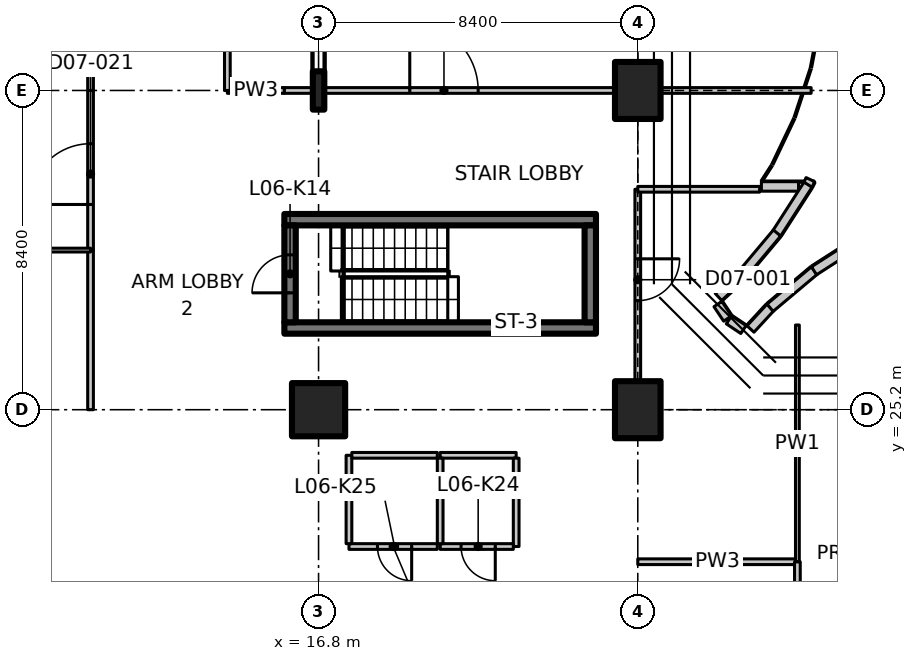
"""IFC4 building model, lengths in metres.
Left out: names, types, materials, properties, quantities, classifications, styles, units other than length and angle.
Written with IfcOpenShell. Run it as: python <this file> out.ifc"""

import sys

from ifc_helpers import new_model, si_unit, direction, frame, frame_2d, origin, origin_2d, place, context, subcontext, project, spatial, polyline, rectangle, i_section, outline, extrude, element, fill, save


model = new_model("IFC4")
c1 = context("Model", 3, precision=1e-05, world=origin(), true_north=direction((0.0, 1.0)))
c2 = subcontext(c1, "Body", "Model", "MODEL_VIEW")
j1 = project(units=[si_unit("LENGTHUNIT", "METRE"), si_unit("PLANEANGLEUNIT", "RADIAN")], contexts=[c1])
p1 = place(None, origin())
s1 = spatial("IfcSite", under=j1, at=p1, CompositionType="ELEMENT")
p2 = place(p1, origin())
s2 = spatial("IfcBuilding", under=s1, at=p2, CompositionType="ELEMENT")
p3 = place(p2, frame((0.0, 0.0, 36.5)))
s3 = spatial("IfcBuildingStorey", under=s2, at=p3, CompositionType="ELEMENT", Elevation=36.5)
p4 = place(p3, frame((16.8, 25.2, 0.0), z_axis=(0.0, 0.0, 1.0), x_axis=(1.0, 0.0, 0.0)))
e1 = element("IfcColumn", 1, at=p4, inside=s3, PredefinedType="COLUMN", context=c2, shape_type="SweptSolid", body=[
    extrude(rectangle(XDim=1.4, YDim=1.4, at=origin_2d()), origin(), (0.0, 0.0, 1.0), 3.35),
])
for number, where, z_axis, x_axis in (
    (2, (25.2, 25.2, 0.0), (0.0, 0.0, 1.0), (1.0, 0.0, 0.0)),
    (3, (25.2, 33.6, 0.0), (0.0, 0.0, 1.0), (1.0, 0.0, 0.0)),
):
    element("IfcColumn", number, at=place(p3, frame(where, z_axis=z_axis, x_axis=x_axis)), inside=s3, PredefinedType="COLUMN", context=c2, shape_type="SweptSolid", body=[
        extrude(rectangle(XDim=1.2, YDim=1.5, at=origin_2d()), origin(), (0.0, 0.0, 1.0), 3.35),
    ])
p5 = place(p3, frame((16.8, 33.6, -0.25), z_axis=(0.0, 0.0, 1.0), x_axis=(1.0, 0.0, 0.0)))
e4 = element("IfcColumn", 4, at=p5, inside=s3, PredefinedType="COLUMN", context=c2, shape_type="SweptSolid", body=[
    extrude(i_section(OverallWidth=0.302, OverallDepth=1.008, WebThickness=0.021, FlangeThickness=0.04, FilletRadius=0.03, at=origin_2d()), origin(), (0.0, 0.0, 1.0), 3.725),
])
p6 = place(p3, frame((28.453, 31.075, 0.0), z_axis=(0.0, 0.0, 1.0), x_axis=(1.0, 0.0, 0.0)))
e5 = element("IfcWall", 5, at=p6, inside=s3, PredefinedType="PARAPET", context=c2, shape_type="SweptSolid", body=[
    extrude(rectangle(XDim=0.977, YDim=0.25, at=frame_2d((0.489, 0.0))), origin(), (0.0, 0.0, 1.0), 1.1),
])
p7 = place(p3, frame((29.742, 31.254, 0.0), z_axis=(0.0, 0.0, 1.0), x_axis=(-0.430340964607, -0.902666413566, 0.0)))
e6 = element("IfcWall", 6, at=p7, inside=s3, PredefinedType="PARAPET", context=c2, shape_type="SweptSolid", body=[
    extrude(rectangle(XDim=0.163, YDim=0.25, at=frame_2d((0.082, 0.0))), origin(), (0.0, 0.0, 1.0), 1.1),
])
for number, where, z_axis, x_axis in (
    (7, (29.68, 31.121, 0.0), (0.0, 0.0, 1.0), (-0.541, -0.841, 0.0)),
    (8, (28.864, 29.85, 0.0), (0.0, 0.0, 1.0), (-0.643, -0.766, 0.0)),
):
    element("IfcWall", number, at=place(p3, frame(where, z_axis=z_axis, x_axis=x_axis)), inside=s3, PredefinedType="PARAPET", context=c2, shape_type="SweptSolid", body=[
        extrude(rectangle(XDim=1.526, YDim=0.25, at=frame_2d((0.763, 0.0))), origin(), (0.0, 0.0, 1.0), 1.1),
    ])
p8 = place(p3, frame((27.894, 28.693, 0.0), z_axis=(0.0, 0.0, 1.0), x_axis=(-0.734682907752, -0.678410661073, 0.0)))
e9 = element("IfcWall", 9, at=p8, inside=s3, PredefinedType="PARAPET", context=c2, shape_type="SweptSolid", body=[
    extrude(rectangle(XDim=0.777, YDim=0.25, at=frame_2d((0.388, 0.0))), origin(), (0.0, 0.0, 1.0), 1.1),
])
for number, where, z_axis, x_axis in (
    (10, (27.309, 27.98, 0.0), (0.0, 0.0, 1.0), (0.556, -0.831, 0.0)),
    (11, (27.599, 27.564, 0.0), (0.0, 0.0, 1.0), (0.831, -0.556, 0.0)),
):
    element("IfcWall", number, at=place(p3, frame(where, z_axis=z_axis, x_axis=x_axis)), inside=s3, PredefinedType="PARAPET", context=c2, shape_type="SweptSolid", body=[
        extrude(rectangle(XDim=0.459, YDim=0.25, at=frame_2d((0.229, 0.0))), origin(), (0.0, 0.0, 1.0), 1.1),
    ])
p9 = place(p3, frame((28.166, 27.323, 0.0), z_axis=(0.0, 0.0, 1.0), x_axis=(0.678410661073, 0.734682907752, 0.0)))
e12 = element("IfcWall", 12, at=p9, inside=s3, PredefinedType="PARAPET", context=c2, shape_type="SweptSolid", body=[
    extrude(rectangle(XDim=0.777, YDim=0.25, at=frame_2d((0.388, 0.0))), origin(), (0.0, 0.0, 1.0), 1.1),
])
for number, where, z_axis, x_axis in (
    (13, (28.682, 27.883, 0.0), (0.0, 0.0, 1.0), (0.766, 0.643, 0.0)),
    (14, (29.837, 28.854, 0.0), (0.0, 0.0, 1.0), (0.841, 0.541, 0.0)),
):
    element("IfcWall", number, at=place(p3, frame(where, z_axis=z_axis, x_axis=x_axis)), inside=s3, PredefinedType="PARAPET", context=c2, shape_type="SweptSolid", body=[
        extrude(rectangle(XDim=1.526, YDim=0.25, at=frame_2d((0.763, 0.0))), origin(), (0.0, 0.0, 1.0), 1.1),
    ])
for number, where, z_axis, x_axis in (
    (15, (15.9, 27.35, 0.0), (0.0, 0.0, 1.0), (1.0, 0.0, 0.0)),
    (16, (15.9, 30.2, 0.0), (0.0, 0.0, 1.0), (1.0, 0.0, 0.0)),
):
    element("IfcWall", number, at=place(p3, frame(where, z_axis=z_axis, x_axis=x_axis)), inside=s3, PredefinedType="SHEAR", context=c2, shape_type="SweptSolid", body=[
        extrude(rectangle(XDim=8.2, YDim=0.3, at=frame_2d((4.1, 0.0))), origin(), (0.0, 0.0, 1.0), 3.35),
    ])
p10 = place(p3, frame((16.05, 27.5, 0.0), z_axis=(0.0, 0.0, 1.0), x_axis=(0.0, 1.0, 0.0)))
e17 = element("IfcWall", 17, at=p10, inside=s3, PredefinedType="SHEAR", context=c2, shape_type="SweptSolid", body=[
    extrude(rectangle(XDim=2.55, YDim=0.3, at=frame_2d((1.275, 0.0))), origin(), (0.0, 0.0, 1.0), 3.35),
])
p11 = place(p10, frame((0.775, 0.0, 0.0)))
e18 = element("IfcOpeningElement", 18, at=p11, cuts=e17, PredefinedType="OPENING", context=c2, shape_type="SweptSolid", body=[
    extrude(rectangle(XDim=1.0, YDim=2.1, at=frame_2d((0.5, 1.05))), frame((0.0, 0.16, 0.0), z_axis=(0.0, -1.0, 0.0), x_axis=(1.0, 0.0, 0.0)), (0.0, 0.0, 1.0), 0.32),
])
p12 = place(p3, frame((23.95, 27.5, 0.0), z_axis=(0.0, 0.0, 1.0), x_axis=(0.0, 1.0, 0.0)))
e19 = element("IfcWall", 19, at=p12, inside=s3, PredefinedType="SHEAR", context=c2, shape_type="SweptSolid", body=[
    extrude(rectangle(XDim=2.55, YDim=0.3, at=frame_2d((1.275, 0.0))), origin(), (0.0, 0.0, 1.0), 3.35),
])
p13 = place(p3, frame((20.0, 24.0, 0.0), z_axis=(0.0, 0.0, 1.0), x_axis=(1.0, 0.0, 0.0)))
e20 = element("IfcWall", 20, at=p13, inside=s3, PredefinedType="PARTITIONING", context=c2, shape_type="SweptSolid", body=[
    extrude(rectangle(XDim=2.0, YDim=0.15, at=frame_2d((1.0, 0.0))), origin(), (0.0, 0.0, 1.0), 3.35),
])
p14 = place(p3, frame((22.0, 23.925, 0.0), z_axis=(0.0, 0.0, 1.0), x_axis=(0.0, -1.0, 0.0)))
e21 = element("IfcWall", 21, at=p14, inside=s3, PredefinedType="PARTITIONING", context=c2, shape_type="SweptSolid", body=[
    extrude(rectangle(XDim=2.325, YDim=0.15, at=frame_2d((1.163, 0.0))), origin(), (0.0, 0.0, 1.0), 3.35),
])
p15 = place(p3, frame((21.925, 21.6, 0.0), z_axis=(0.0, 0.0, 1.0), x_axis=(-1.0, 0.0, 0.0)))
e22 = element("IfcWall", 22, at=p15, inside=s3, PredefinedType="PARTITIONING", context=c2, shape_type="SweptSolid", body=[
    extrude(rectangle(XDim=1.925, YDim=0.15, at=frame_2d((0.962, 0.0))), origin(), (0.0, 0.0, 1.0), 3.35),
])
p16 = place(p15, frame((0.475, 0.0, 0.0)))
e23 = element("IfcOpeningElement", 23, at=p16, cuts=e22, PredefinedType="OPENING", context=c2, shape_type="SweptSolid", body=[
    extrude(rectangle(XDim=0.9, YDim=2.1, at=frame_2d((0.45, 1.05))), frame((0.0, 0.085, 0.0), z_axis=(0.0, -1.0, 0.0), x_axis=(1.0, 0.0, 0.0)), (0.0, 0.0, 1.0), 0.17),
])
p17 = place(p3, frame((20.0, 21.675, 0.0), z_axis=(0.0, 0.0, 1.0), x_axis=(0.0, 1.0, 0.0)))
e24 = element("IfcWall", 24, at=p17, inside=s3, PredefinedType="PARTITIONING", context=c2, shape_type="SweptSolid", body=[
    extrude(rectangle(XDim=2.25, YDim=0.15, at=frame_2d((1.125, 0.0))), origin(), (0.0, 0.0, 1.0), 3.35),
])
p18 = place(p3, frame((19.925, 21.6, 0.0), z_axis=(0.0, 0.0, 1.0), x_axis=(-1.0, 0.0, 0.0)))
e25 = element("IfcWall", 25, at=p18, inside=s3, PredefinedType="PARTITIONING", context=c2, shape_type="SweptSolid", body=[
    extrude(rectangle(XDim=2.325, YDim=0.15, at=frame_2d((1.163, 0.0))), origin(), (0.0, 0.0, 1.0), 3.35),
])
p19 = place(p18, frame((0.675, 0.0, 0.0)))
e26 = element("IfcOpeningElement", 26, at=p19, cuts=e25, PredefinedType="OPENING", context=c2, shape_type="SweptSolid", body=[
    extrude(rectangle(XDim=0.9, YDim=2.1, at=frame_2d((0.45, 1.05))), frame((0.0, 0.085, 0.0), z_axis=(0.0, -1.0, 0.0), x_axis=(1.0, 0.0, 0.0)), (0.0, 0.0, 1.0), 0.17),
])
p20 = place(p3, frame((17.6, 21.675, 0.0), z_axis=(0.0, 0.0, 1.0), x_axis=(0.0, 1.0, 0.0)))
e27 = element("IfcWall", 27, at=p20, inside=s3, PredefinedType="PARTITIONING", context=c2, shape_type="SweptSolid", body=[
    extrude(rectangle(XDim=2.325, YDim=0.15, at=frame_2d((1.163, 0.0))), origin(), (0.0, 0.0, 1.0), 3.35),
])
p21 = place(p3, frame((17.675, 24.0, 0.0), z_axis=(0.0, 0.0, 1.0), x_axis=(1.0, 0.0, 0.0)))
e28 = element("IfcWall", 28, at=p21, inside=s3, PredefinedType="PARTITIONING", context=c2, shape_type="SweptSolid", body=[
    extrude(rectangle(XDim=2.25, YDim=0.15, at=frame_2d((1.125, 0.0))), origin(), (0.0, 0.0, 1.0), 3.35),
])
p22 = place(p3, frame((25.2, 21.2, 0.0), z_axis=(0.0, 0.0, 1.0), x_axis=(1.0, 0.0, 0.0)))
e29 = element("IfcWall", 29, at=p22, inside=s3, PredefinedType="PARTITIONING", context=c2, shape_type="SweptSolid", body=[
    extrude(rectangle(XDim=4.2, YDim=0.15, at=frame_2d((2.1, 0.0))), origin(), (0.0, 0.0, 1.0), 3.33),
])
p23 = place(p3, frame((29.4, 21.2, 0.0), z_axis=(0.0, 0.0, 1.0), x_axis=(0.0, -1.0, 0.0)))
e30 = element("IfcWall", 30, at=p23, inside=s3, PredefinedType="PARTITIONING", context=c2, shape_type="SweptSolid", body=[
    extrude(rectangle(XDim=8.2, YDim=0.15, at=frame_2d((4.1, 0.0))), origin(), (0.0, 0.0, 1.0), 3.33),
])
p24 = place(p23, frame((3.3, 0.0, 0.0)))
e31 = element("IfcOpeningElement", 31, at=p24, cuts=e30, PredefinedType="OPENING", context=c2, shape_type="SweptSolid", body=[
    extrude(rectangle(XDim=1.6, YDim=2.1, at=frame_2d((0.8, 1.05))), frame((0.0, 0.085, 0.0), z_axis=(0.0, -1.0, 0.0), x_axis=(1.0, 0.0, 0.0)), (0.0, 0.0, 1.0), 0.17),
])
p25 = place(p3, frame((29.4, 27.429, 0.0), z_axis=(0.0, 0.0, 1.0), x_axis=(0.0, -1.0, 0.0)))
e32 = element("IfcWall", 32, at=p25, inside=s3, PredefinedType="PARTITIONING", context=c2, shape_type="SweptSolid", body=[
    extrude(outline(polyline([(0.0, 0.0), (6.229, 0.0), (6.229, 3.33), (2.679, 3.33), (2.677, 2.98), (1.781, 2.98), (1.779, 3.33), (0.154, 3.33), (0.0, 3.33), (0.0, 0.0)])), frame((0.0, 0.05, 0.0), z_axis=(0.0, -1.0, 0.0), x_axis=(1.0, 0.0, 0.0)), (0.0, 0.0, 1.0), 0.1),
])
p26 = place(p3, frame((25.2, 31.0, 0.0), z_axis=(0.0, 0.0, 1.0), x_axis=(0.0, -1.0, 0.0)))
e33 = element("IfcWall", 33, at=p26, inside=s3, PredefinedType="PARTITIONING", context=c2, shape_type="SweptSolid", body=[
    extrude(outline(polyline([(0.0, 0.0), (5.03, 0.0), (5.03, 2.98), (0.0, 2.98), (0.0, 0.0)])), frame((0.0, 0.075, 0.0), z_axis=(0.0, -1.0, 0.0), x_axis=(1.0, 0.0, 0.0)), (0.0, 0.0, 1.0), 0.15),
])
p27 = place(p26, frame((1.83, 0.0, 0.0)))
e34 = element("IfcOpeningElement", 34, at=p27, cuts=e33, PredefinedType="OPENING", context=c2, shape_type="SweptSolid", body=[
    extrude(rectangle(XDim=1.1, YDim=2.1, at=frame_2d((0.55, 1.05))), frame((0.0, 0.085, 0.0), z_axis=(0.0, -1.0, 0.0), x_axis=(1.0, 0.0, 0.0)), (0.0, 0.0, 1.0), 0.17),
])
p28 = place(p3, frame((25.2, 31.0, 0.0), z_axis=(0.0, 0.0, 1.0), x_axis=(1.0, 0.0, 0.0)))
e35 = element("IfcWall", 35, at=p28, inside=s3, PredefinedType="PARTITIONING", context=c2, shape_type="SweptSolid", body=[
    extrude(rectangle(XDim=3.206, YDim=0.15, at=frame_2d((1.603, 0.0))), origin(), (0.0, 0.0, 1.0), 2.98),
])
p29 = place(p3, frame((10.8, 29.4, 0.0), z_axis=(0.0, 0.0, 1.0), x_axis=(0.0, 1.0, 0.0)))
e36 = element("IfcWall", 36, at=p29, inside=s3, PredefinedType="PARTITIONING", context=c2, shape_type="SweptSolid", body=[
    extrude(rectangle(XDim=4.2, YDim=0.15, at=frame_2d((2.1, 0.0))), origin(), (0.0, 0.0, 1.0), 3.33),
])
p30 = place(p29, frame((1.2, 0.0, 0.0)))
e37 = element("IfcOpeningElement", 37, at=p30, cuts=e36, PredefinedType="OPENING", context=c2, shape_type="SweptSolid", body=[
    extrude(rectangle(XDim=1.6, YDim=2.1, at=frame_2d((0.8, 1.05))), frame((0.0, 0.085, 0.0), z_axis=(0.0, -1.0, 0.0), x_axis=(1.0, 0.0, 0.0)), (0.0, 0.0, 1.0), 0.17),
])
p31 = place(p3, frame((10.8, 25.2, 0.0), z_axis=(0.0, 0.0, 1.0), x_axis=(0.0, 1.0, 0.0)))
e38 = element("IfcWall", 38, at=p31, inside=s3, PredefinedType="PARTITIONING", context=c2, shape_type="SweptSolid", body=[
    extrude(rectangle(XDim=4.2, YDim=0.15, at=frame_2d((2.1, 0.0))), origin(), (0.0, 0.0, 1.0), 3.33),
])
p32 = place(p3, frame((14.4, 33.6, 0.0), z_axis=(0.0, 0.0, 1.0), x_axis=(1.0, 0.0, 0.0)))
e39 = element("IfcWall", 39, at=p32, inside=s3, PredefinedType="PARTITIONING", context=c2, shape_type="SweptSolid", body=[
    extrude(rectangle(XDim=1.5, YDim=0.15, at=frame_2d((0.75, 0.0))), origin(), (0.0, 0.0, 1.0), 3.33),
])
p33 = place(p3, frame((15.9, 33.6, 0.0), z_axis=(0.0, 0.0, 1.0), x_axis=(1.0, 0.0, 0.0)))
e40 = element("IfcWall", 40, at=p33, inside=s3, PredefinedType="PARTITIONING", context=c2, shape_type="SweptSolid", body=[
    extrude(rectangle(XDim=8.68, YDim=0.15, at=frame_2d((4.34, 0.0))), origin(), (0.0, 0.0, 1.0), 3.33),
])
p34 = place(p33, frame((3.3, 0.0, 0.0)))
e41 = element("IfcOpeningElement", 41, at=p34, cuts=e40, PredefinedType="OPENING", context=c2, shape_type="SweptSolid", body=[
    extrude(rectangle(XDim=1.8, YDim=2.1, at=frame_2d((0.9, 1.05))), frame((0.0, 0.085, 0.0), z_axis=(0.0, -1.0, 0.0), x_axis=(1.0, 0.0, 0.0)), (0.0, 0.0, 1.0), 0.17),
])
p35 = place(p3, frame((25.82, 33.6, 0.0), z_axis=(0.0, 0.0, 1.0), x_axis=(1.0, 0.0, 0.0)))
e42 = element("IfcWall", 42, at=p35, inside=s3, PredefinedType="PARTITIONING", context=c2, shape_type="SweptSolid", body=[
    extrude(rectangle(XDim=3.942, YDim=0.15, at=frame_2d((1.971, 0.0))), origin(), (0.0, 0.0, 1.0), 2.98),
])
p36 = place(p3, frame((10.8, 33.6, 0.0), z_axis=(0.0, 0.0, 1.0), x_axis=(0.0, 1.0, 0.0)))
e43 = element("IfcWall", 43, at=p36, inside=s3, PredefinedType="PARTITIONING", context=c2, shape_type="SweptSolid", body=[
    extrude(rectangle(XDim=4.2, YDim=0.15, at=frame_2d((2.1, 0.0))), origin(), (0.0, 0.0, 1.0), 3.33),
])
p37 = place(p3, frame((14.4, 42.0, 0.0), z_axis=(0.0, 0.0, 1.0), x_axis=(0.0, -1.0, 0.0)))
e44 = element("IfcWall", 44, at=p37, inside=s3, PredefinedType="PARTITIONING", context=c2, shape_type="SweptSolid", body=[
    extrude(rectangle(XDim=8.4, YDim=0.15, at=frame_2d((4.2, 0.0))), origin(), (0.0, 0.0, 1.0), 3.33),
])
p38 = place(p3, frame((10.8, 29.4, 0.0), z_axis=(0.0, 0.0, 1.0), x_axis=(-1.0, 0.0, 0.0)))
e45 = element("IfcWall", 45, at=p38, inside=s3, PredefinedType="PARTITIONING", context=c2, shape_type="SweptSolid", body=[
    extrude(rectangle(XDim=3.6, YDim=0.1, at=frame_2d((1.8, 0.0))), origin(), (0.0, 0.0, 1.0), 3.33),
])
p39 = place(p11, origin())
e46 = element("IfcDoor", 46, at=p39, inside=s3, OperationType="SINGLE_SWING_RIGHT", PredefinedType="DOOR", context=c2, shape_type="SweptSolid", body=[
    extrude(rectangle(XDim=1.0, YDim=2.1, at=frame_2d((0.5, 1.05))), frame((0.0, 0.025, 0.0), z_axis=(0.0, -1.0, 0.0), x_axis=(1.0, 0.0, 0.0)), (0.0, 0.0, 1.0), 0.05),
])
fill(e18, e46)
p40 = place(p16, origin())
e47 = element("IfcDoor", 47, at=p40, inside=s3, OperationType="SINGLE_SWING_RIGHT", PredefinedType="DOOR", context=c2, shape_type="SweptSolid", body=[
    extrude(rectangle(XDim=0.9, YDim=2.1, at=frame_2d((0.45, 1.05))), frame((0.0, 0.025, 0.0), z_axis=(0.0, -1.0, 0.0), x_axis=(1.0, 0.0, 0.0)), (0.0, 0.0, 1.0), 0.05),
])
fill(e23, e47)
p41 = place(p19, origin())
e48 = element("IfcDoor", 48, at=p41, inside=s3, OperationType="SINGLE_SWING_LEFT", PredefinedType="DOOR", context=c2, shape_type="SweptSolid", body=[
    extrude(rectangle(XDim=0.9, YDim=2.1, at=frame_2d((0.45, 1.05))), frame((0.0, 0.025, 0.0), z_axis=(0.0, -1.0, 0.0), x_axis=(1.0, 0.0, 0.0)), (0.0, 0.0, 1.0), 0.05),
])
fill(e26, e48)
p42 = place(p27, origin())
e49 = element("IfcDoor", 49, at=p42, inside=s3, OperationType="SINGLE_SWING_RIGHT", PredefinedType="DOOR", context=c2, shape_type="SweptSolid", body=[
    extrude(rectangle(XDim=1.1, YDim=2.1, at=frame_2d((0.55, 1.05))), frame((0.0, 0.025, 0.0), z_axis=(0.0, -1.0, 0.0), x_axis=(1.0, 0.0, 0.0)), (0.0, 0.0, 1.0), 0.05),
])
fill(e34, e49)
p43 = place(p30, origin())
e50 = element("IfcDoor", 50, at=p43, inside=s3, OperationType="DOUBLE_DOOR_SINGLE_SWING", PredefinedType="DOOR", context=c2, shape_type="SweptSolid", body=[
    extrude(rectangle(XDim=1.6, YDim=2.1, at=frame_2d((0.8, 1.05))), frame((0.0, 0.025, 0.0), z_axis=(0.0, -1.0, 0.0), x_axis=(1.0, 0.0, 0.0)), (0.0, 0.0, 1.0), 0.05),
])
fill(e37, e50)
p44 = place(p34, origin())
e51 = element("IfcDoor", 51, at=p44, inside=s3, OperationType="DOUBLE_DOOR_SINGLE_SWING", PredefinedType="DOOR", context=c2, shape_type="SweptSolid", body=[
    extrude(rectangle(XDim=1.8, YDim=2.1, at=frame_2d((0.9, 1.05))), frame((0.0, 0.025, 0.0), z_axis=(0.0, -1.0, 0.0), x_axis=(1.0, 0.0, 0.0)), (0.0, 0.0, 1.0), 0.05),
])
fill(e41, e51)
save(model, sys.argv[1])
